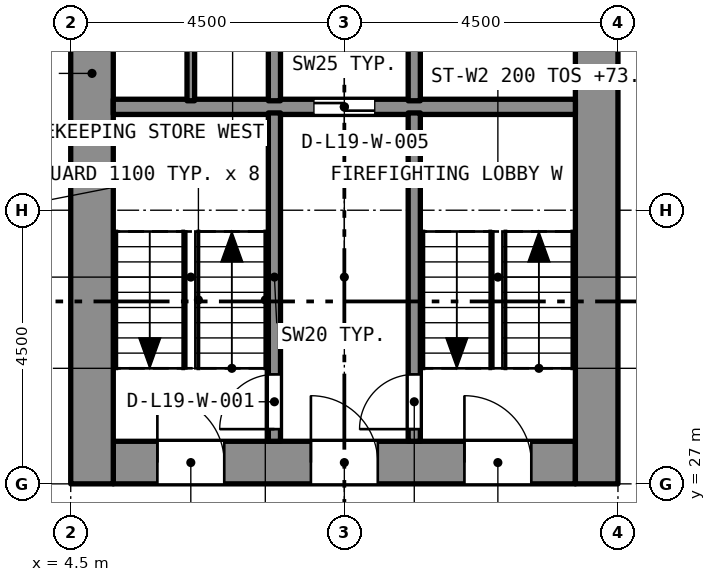
"""IFC4 building model, lengths in metres.
Left out: names, types, materials, properties, quantities, classifications, styles, units other than length and angle.
Written with IfcOpenShell. Run it as: python <this file> out.ifc"""

import sys

from ifc_helpers import new_model, si_unit, direction, frame, frame_2d, origin, place, context, subcontext, project, spatial, rectangle, extrude, element, fill, save


model = new_model("IFC4")
c1 = context("Model", 3, precision=1e-05, world=origin(), true_north=direction((0.0, 1.0)))
c2 = subcontext(c1, "Body", "Model", "MODEL_VIEW")
j1 = project(units=[si_unit("LENGTHUNIT", "METRE"), si_unit("PLANEANGLEUNIT", "RADIAN")], contexts=[c1])
p1 = place(None, origin())
s1 = spatial("IfcSite", under=j1, at=p1, CompositionType="ELEMENT")
p2 = place(p1, origin())
s2 = spatial("IfcBuilding", under=s1, at=p2, CompositionType="ELEMENT")
p3 = place(p2, frame((0.0, 0.0, 72.0)))
s3 = spatial("IfcBuildingStorey", under=s2, at=p3, CompositionType="ELEMENT", Elevation=72.0)
p4 = place(p3, frame((5.2, 27.35, 0.0), z_axis=(0.0, 0.0, 1.0), x_axis=(1.0, 0.0, 0.0)))
e1 = element("IfcWall", 1, at=p4, inside=s3, PredefinedType="SOLIDWALL", context=c2, shape_type="SweptSolid", body=[
    extrude(rectangle(XDim=7.6, YDim=0.7, at=frame_2d((3.8, 0.0))), origin(), (0.0, 0.0, 1.0), 3.2),
])
p5 = place(p4, frame((0.725, 0.0, 0.0)))
e2 = element("IfcOpeningElement", 2, at=p5, cuts=e1, PredefinedType="OPENING", context=c2, shape_type="SweptSolid", body=[
    extrude(rectangle(XDim=1.1, YDim=2.1, at=frame_2d((0.55, 1.05))), frame((0.0, 0.36, 0.0), z_axis=(0.0, -1.0, 0.0), x_axis=(1.0, 0.0, 0.0)), (0.0, 0.0, 1.0), 0.72),
])
p6 = place(p4, frame((3.25, 0.0, 0.0)))
e3 = element("IfcOpeningElement", 3, at=p6, cuts=e1, PredefinedType="OPENING", context=c2, shape_type="SweptSolid", body=[
    extrude(rectangle(XDim=1.1, YDim=2.1, at=frame_2d((0.55, 1.05))), frame((0.0, 0.36, 0.0), z_axis=(0.0, -1.0, 0.0), x_axis=(1.0, 0.0, 0.0)), (0.0, 0.0, 1.0), 0.72),
])
p7 = place(p4, frame((5.775, 0.0, 0.0)))
e4 = element("IfcOpeningElement", 4, at=p7, cuts=e1, PredefinedType="OPENING", context=c2, shape_type="SweptSolid", body=[
    extrude(rectangle(XDim=1.1, YDim=2.1, at=frame_2d((0.55, 1.05))), frame((0.0, 0.36, 0.0), z_axis=(0.0, -1.0, 0.0), x_axis=(1.0, 0.0, 0.0)), (0.0, 0.0, 1.0), 0.72),
])
p8 = place(p3, frame((4.85, 27.0, 0.0), z_axis=(0.0, 0.0, 1.0), x_axis=(0.0, 1.0, 0.0)))
e5 = element("IfcWall", 5, at=p8, inside=s3, PredefinedType="SOLIDWALL", context=c2, shape_type="SweptSolid", body=[
    extrude(rectangle(XDim=13.5, YDim=0.7, at=frame_2d((6.75, 0.0))), origin(), (0.0, 0.0, 1.0), 3.2),
])
p9 = place(p8, frame((8.95, 0.0, 0.0)))
e6 = element("IfcOpeningElement", 6, at=p9, cuts=e5, PredefinedType="OPENING", context=c2, shape_type="SweptSolid", body=[
    extrude(rectangle(XDim=1.2, YDim=2.1, at=frame_2d((0.6, 1.05))), frame((0.0, 0.36, 0.0), z_axis=(0.0, -1.0, 0.0), x_axis=(1.0, 0.0, 0.0)), (0.0, 0.0, 1.0), 0.72),
])
p10 = place(p3, frame((13.15, 27.0, 0.0), z_axis=(0.0, 0.0, 1.0), x_axis=(0.0, 1.0, 0.0)))
e7 = element("IfcWall", 7, at=p10, inside=s3, PredefinedType="SOLIDWALL", context=c2, shape_type="SweptSolid", body=[
    extrude(rectangle(XDim=13.5, YDim=0.7, at=frame_2d((6.75, 0.0))), origin(), (0.0, 0.0, 1.0), 3.2),
])
p11 = place(p10, frame((11.1, 0.0, 0.0)))
e8 = element("IfcOpeningElement", 8, at=p11, cuts=e7, PredefinedType="OPENING", context=c2, shape_type="SweptSolid", body=[
    extrude(rectangle(XDim=1.1, YDim=2.1, at=frame_2d((0.55, 1.05))), frame((0.0, 0.36, 0.0), z_axis=(0.0, -1.0, 0.0), x_axis=(1.0, 0.0, 0.0)), (0.0, 0.0, 1.0), 0.72),
])
p12 = place(p10, frame((8.95, 0.0, 0.0)))
e9 = element("IfcOpeningElement", 9, at=p12, cuts=e7, PredefinedType="OPENING", context=c2, shape_type="SweptSolid", body=[
    extrude(rectangle(XDim=1.2, YDim=2.1, at=frame_2d((0.6, 1.05))), frame((0.0, 0.36, 0.0), z_axis=(0.0, -1.0, 0.0), x_axis=(1.0, 0.0, 0.0)), (0.0, 0.0, 1.0), 0.72),
])
p13 = place(p3, frame((5.2, 33.2, 0.0), z_axis=(0.0, 0.0, 1.0), x_axis=(1.0, 0.0, 0.0)))
e10 = element("IfcWall", 10, at=p13, inside=s3, PredefinedType="SOLIDWALL", context=c2, shape_type="SweptSolid", body=[
    extrude(rectangle(XDim=7.6, YDim=0.25, at=frame_2d((3.8, 0.0))), origin(), (0.0, 0.0, 1.0), 2.7),
])
p14 = place(p13, frame((3.3, 0.0, 0.0)))
e11 = element("IfcOpeningElement", 11, at=p14, cuts=e10, PredefinedType="OPENING", context=c2, shape_type="SweptSolid", body=[
    extrude(rectangle(XDim=1.0, YDim=2.1, at=frame_2d((0.5, 1.05))), frame((0.0, 0.135, 0.0), z_axis=(0.0, -1.0, 0.0), x_axis=(1.0, 0.0, 0.0)), (0.0, 0.0, 1.0), 0.27),
])
p15 = place(p3, frame((7.85, 27.7, 0.0), z_axis=(0.0, 0.0, 1.0), x_axis=(0.0, 1.0, 0.0)))
e12 = element("IfcWall", 12, at=p15, inside=s3, PredefinedType="SOLIDWALL", context=c2, shape_type="SweptSolid", body=[
    extrude(rectangle(XDim=5.4, YDim=0.2, at=frame_2d((2.7, 0.0))), origin(), (0.0, 0.0, 1.0), 2.7),
])
p16 = place(p15, frame((0.2, 0.0, 0.0)))
e13 = element("IfcOpeningElement", 13, at=p16, cuts=e12, PredefinedType="OPENING", context=c2, shape_type="SweptSolid", body=[
    extrude(rectangle(XDim=0.9, YDim=2.1, at=frame_2d((0.45, 1.05))), frame((0.0, 0.11, 0.0), z_axis=(0.0, -1.0, 0.0), x_axis=(1.0, 0.0, 0.0)), (0.0, 0.0, 1.0), 0.22),
])
p17 = place(p3, frame((10.15, 27.7, 0.0), z_axis=(0.0, 0.0, 1.0), x_axis=(0.0, 1.0, 0.0)))
e14 = element("IfcWall", 14, at=p17, inside=s3, PredefinedType="SOLIDWALL", context=c2, shape_type="SweptSolid", body=[
    extrude(rectangle(XDim=5.4, YDim=0.2, at=frame_2d((2.7, 0.0))), origin(), (0.0, 0.0, 1.0), 2.7),
])
p18 = place(p17, frame((0.2, 0.0, 0.0)))
e15 = element("IfcOpeningElement", 15, at=p18, cuts=e14, PredefinedType="OPENING", context=c2, shape_type="SweptSolid", body=[
    extrude(rectangle(XDim=0.9, YDim=2.1, at=frame_2d((0.45, 1.05))), frame((0.0, 0.11, 0.0), z_axis=(0.0, -1.0, 0.0), x_axis=(1.0, 0.0, 0.0)), (0.0, 0.0, 1.0), 0.22),
])
for number, where, z_axis, x_axis in (
    (16, (7.85, 33.3, 0.0), (0.0, 0.0, 1.0), (0.0, 1.0, 0.0)),
    (17, (10.15, 33.3, 0.0), (0.0, 0.0, 1.0), (0.0, 1.0, 0.0)),
):
    element("IfcWall", number, at=place(p3, frame(where, z_axis=z_axis, x_axis=x_axis)), inside=s3, PredefinedType="SOLIDWALL", context=c2, shape_type="SweptSolid", body=[
        extrude(rectangle(XDim=2.3, YDim=0.2, at=frame_2d((1.15, 0.0))), origin(), (0.0, 0.0, 1.0), 2.7),
    ])
p19 = place(p3, frame((6.475, 33.3, 0.0), z_axis=(0.0, 0.0, 1.0), x_axis=(0.0, 1.0, 0.0)))
e18 = element("IfcWall", 18, at=p19, inside=s3, PredefinedType="PARTITIONING", context=c2, shape_type="SweptSolid", body=[
    extrude(rectangle(XDim=2.3, YDim=0.125, at=frame_2d((1.15, 0.0))), origin(), (0.0, 0.0, 1.0), 2.7),
])
p20 = place(p16, origin())
e19 = element("IfcDoor", 19, at=p20, inside=s3, OperationType="SINGLE_SWING_LEFT", PredefinedType="DOOR", context=c2, shape_type="SweptSolid", body=[
    extrude(rectangle(XDim=0.9, YDim=2.1, at=frame_2d((0.45, 1.05))), frame((0.0, 0.025, 0.0), z_axis=(0.0, -1.0, 0.0), x_axis=(1.0, 0.0, 0.0)), (0.0, 0.0, 1.0), 0.05),
])
fill(e13, e19)
p21 = place(p18, origin())
e20 = element("IfcDoor", 20, at=p21, inside=s3, OperationType="SINGLE_SWING_LEFT", PredefinedType="DOOR", context=c2, shape_type="SweptSolid", body=[
    extrude(rectangle(XDim=0.9, YDim=2.1, at=frame_2d((0.45, 1.05))), frame((0.0, 0.025, 0.0), z_axis=(0.0, -1.0, 0.0), x_axis=(1.0, 0.0, 0.0)), (0.0, 0.0, 1.0), 0.05),
])
fill(e15, e20)
p22 = place(p14, origin())
e21 = element("IfcDoor", 21, at=p22, inside=s3, OperationType="SLIDING_TO_LEFT", PredefinedType="DOOR", context=c2, shape_type="SweptSolid", body=[
    extrude(rectangle(XDim=1.0, YDim=2.1, at=frame_2d((0.5, 1.05))), frame((0.0, 0.025, 0.0), z_axis=(0.0, -1.0, 0.0), x_axis=(1.0, 0.0, 0.0)), (0.0, 0.0, 1.0), 0.05),
])
fill(e11, e21)
p23 = place(p5, origin())
e22 = element("IfcDoor", 22, at=p23, inside=s3, OperationType="SINGLE_SWING_LEFT", PredefinedType="DOOR", context=c2, shape_type="SweptSolid", body=[
    extrude(rectangle(XDim=1.1, YDim=2.1, at=frame_2d((0.55, 1.05))), frame((0.0, 0.025, 0.0), z_axis=(0.0, -1.0, 0.0), x_axis=(1.0, 0.0, 0.0)), (0.0, 0.0, 1.0), 0.05),
])
fill(e2, e22)
p24 = place(p6, origin())
e23 = element("IfcDoor", 23, at=p24, inside=s3, OperationType="SINGLE_SWING_LEFT", PredefinedType="DOOR", context=c2, shape_type="SweptSolid", body=[
    extrude(rectangle(XDim=1.1, YDim=2.1, at=frame_2d((0.55, 1.05))), frame((0.0, 0.025, 0.0), z_axis=(0.0, -1.0, 0.0), x_axis=(1.0, 0.0, 0.0)), (0.0, 0.0, 1.0), 0.05),
])
fill(e3, e23)
p25 = place(p7, origin())
e24 = element("IfcDoor", 24, at=p25, inside=s3, OperationType="SINGLE_SWING_LEFT", PredefinedType="DOOR", context=c2, shape_type="SweptSolid", body=[
    extrude(rectangle(XDim=1.1, YDim=2.1, at=frame_2d((0.55, 1.05))), frame((0.0, 0.025, 0.0), z_axis=(0.0, -1.0, 0.0), x_axis=(1.0, 0.0, 0.0)), (0.0, 0.0, 1.0), 0.05),
])
fill(e4, e24)
save(model, sys.argv[1])
